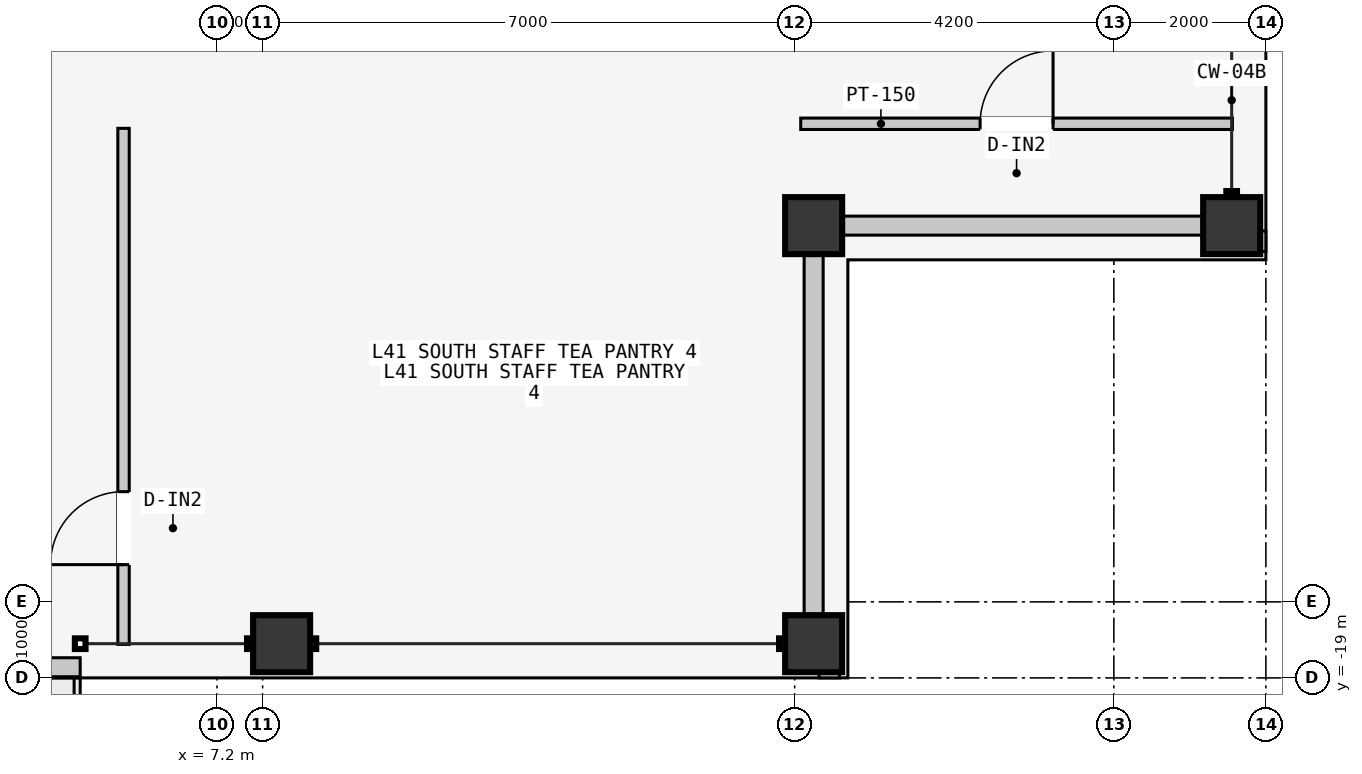
"""IFC4 building model, lengths in metres.
Left out: names, types, materials, properties, quantities, classifications, styles, units other than length and angle.
Written with IfcOpenShell. Run it as: python <this file> out.ifc"""

import sys

from ifc_helpers import new_model, si_unit, direction, frame, frame_2d, origin, origin_2d, place, context, subcontext, project, spatial, rectangle, hollow_rectangle, extrude, element, fill, save


model = new_model("IFC4")
c1 = context("Model", 3, precision=1e-05, world=origin(), true_north=direction((0.0, 1.0)))
c2 = subcontext(c1, "Body", "Model", "MODEL_VIEW")
j1 = project(units=[si_unit("LENGTHUNIT", "METRE"), si_unit("PLANEANGLEUNIT", "RADIAN")], contexts=[c1])
p1 = place(None, origin())
s1 = spatial("IfcSite", under=j1, at=p1, CompositionType="ELEMENT")
p2 = place(p1, origin())
s2 = spatial("IfcBuilding", under=s1, at=p2, CompositionType="ELEMENT")
p3 = place(p2, frame((0.0, 0.0, 158.7)))
s3 = spatial("IfcBuildingStorey", under=s2, at=p3, CompositionType="ELEMENT", Elevation=158.7)
for number, where, z_axis, x_axis in (
    (1, (8.05, -18.55, 0.0), (0.0, 0.0, 1.0), (1.0, 0.0, 0.0)),
    (2, (15.05, -18.55, 0.0), (0.0, 0.0, 1.0), (1.0, 0.0, 0.0)),
    (3, (20.55, -13.05, 0.0), (0.0, 0.0, 1.0), (0.0, 1.0, 0.0)),
    (4, (15.05, -13.05, 0.0), (0.0, 0.0, 1.0), (1.0, 0.0, 0.0)),
):
    element("IfcColumn", number, at=place(p3, frame(where, z_axis=z_axis, x_axis=x_axis)), inside=s3, PredefinedType="COLUMN", context=c2, shape_type="SweptSolid", body=[
        extrude(hollow_rectangle(XDim=0.75, YDim=0.75, WallThickness=0.032, at=origin_2d()), origin(), (0.0, 0.0, 1.0), 3.6),
    ])
p4 = place(p3, frame((-5.4, -18.86, 0.0), z_axis=(0.0, 0.0, 1.0), x_axis=(1.0, 0.0, 0.0)))
e5 = element("IfcWall", 5, at=p4, inside=s3, PredefinedType="STANDARD", context=c2, shape_type="SweptSolid", body=[
    extrude(rectangle(XDim=10.8, YDim=0.25, at=frame_2d((5.4, 0.0))), origin(), (0.0, 0.0, 1.0), 3.4),
])
p5 = place(p4, frame((7.0, 0.0, 0.0)))
e6 = element("IfcOpeningElement", 6, at=p5, cuts=e5, PredefinedType="OPENING", context=c2, shape_type="SweptSolid", body=[
    extrude(rectangle(XDim=1.6, YDim=2.2, at=frame_2d((0.8, 1.1))), frame((0.0, 0.135, 0.0), z_axis=(0.0, -1.0, 0.0), x_axis=(1.0, 0.0, 0.0)), (0.0, 0.0, 1.0), 0.27),
])
p6 = place(p4, frame((1.8, 0.0, 0.85)))
e7 = element("IfcOpeningElement", 7, at=p6, cuts=e5, PredefinedType="OPENING", context=c2, shape_type="SweptSolid", body=[
    extrude(rectangle(XDim=2.0, YDim=2.1, at=frame_2d((1.0, 1.05))), frame((0.0, 0.135, 0.0), z_axis=(0.0, -1.0, 0.0), x_axis=(1.0, 0.0, 0.0)), (0.0, 0.0, 1.0), 0.27),
])
for number, where, z_axis, x_axis in (
    (8, (15.435, -13.05, 0.0), (0.0, 0.0, 1.0), (1.0, 0.0, 0.0)),
    (9, (15.05, -18.165, 0.0), (0.0, 0.0, 1.0), (0.0, 1.0, 0.0)),
):
    element("IfcWall", number, at=place(p3, frame(where, z_axis=z_axis, x_axis=x_axis)), inside=s3, PredefinedType="STANDARD", context=c2, shape_type="SweptSolid", body=[
        extrude(rectangle(XDim=4.73, YDim=0.25, at=frame_2d((2.365, 0.0))), origin(), (0.0, 0.0, 1.0), 2.75),
    ])
for number, where, z_axis, x_axis in (
    (10, (15.12, -18.89, 0.0), (0.0, 0.0, 1.0), (1.0, 0.0, 0.0)),
    (11, (20.89, -13.39, 0.0), (0.0, 0.0, 1.0), (0.0, 1.0, 0.0)),
):
    element("IfcWall", number, at=place(p3, frame(where, z_axis=z_axis, x_axis=x_axis)), inside=s3, PredefinedType="PARAPET", context=c2, shape_type="SweptSolid", body=[
        extrude(rectangle(XDim=0.27, YDim=0.22, at=frame_2d((0.135, 0.0))), origin(), (0.0, 0.0, 1.0), 1.2),
    ])
p7 = place(p3, frame((5.97, -18.56, 0.0), z_axis=(0.0, 0.0, 1.0), x_axis=(0.0, 1.0, 0.0)))
e12 = element("IfcWall", 12, at=p7, inside=s3, PredefinedType="PARTITIONING", context=c2, shape_type="SweptSolid", body=[
    extrude(rectangle(XDim=6.79, YDim=0.15, at=frame_2d((3.395, 0.0))), origin(), (0.0, 0.0, 1.0), 3.4),
])
p8 = place(p7, frame((1.05, 0.0, 0.0)))
e13 = element("IfcOpeningElement", 13, at=p8, cuts=e12, PredefinedType="OPENING", context=c2, shape_type="SweptSolid", body=[
    extrude(rectangle(XDim=0.96, YDim=2.18, at=frame_2d((0.48, 1.09))), frame((0.0, 0.085, 0.0), z_axis=(0.0, -1.0, 0.0), x_axis=(1.0, 0.0, 0.0)), (0.0, 0.0, 1.0), 0.17),
])
p9 = place(p3, frame((14.88, -11.71, 0.0), z_axis=(0.0, 0.0, 1.0), x_axis=(1.0, 0.0, 0.0)))
e14 = element("IfcWall", 14, at=p9, inside=s3, PredefinedType="PARTITIONING", context=c2, shape_type="SweptSolid", body=[
    extrude(rectangle(XDim=5.68, YDim=0.15, at=frame_2d((2.84, 0.0))), origin(), (0.0, 0.0, 1.0), 3.4),
])
p10 = place(p9, frame((2.36, 0.0, 0.0)))
e15 = element("IfcOpeningElement", 15, at=p10, cuts=e14, PredefinedType="OPENING", context=c2, shape_type="SweptSolid", body=[
    extrude(rectangle(XDim=0.96, YDim=2.18, at=frame_2d((0.48, 1.09))), frame((0.0, 0.085, 0.0), z_axis=(0.0, -1.0, 0.0), x_axis=(1.0, 0.0, 0.0)), (0.0, 0.0, 1.0), 0.17),
])
p11 = place(p8, origin())
e16 = element("IfcDoor", 16, at=p11, inside=s3, OperationType="SINGLE_SWING_LEFT", PredefinedType="DOOR", context=c2, shape_type="SweptSolid", body=[
    extrude(rectangle(XDim=0.96, YDim=2.18, at=frame_2d((0.48, 1.09))), frame((0.0, 0.025, 0.0), z_axis=(0.0, -1.0, 0.0), x_axis=(1.0, 0.0, 0.0)), (0.0, 0.0, 1.0), 0.05),
])
fill(e13, e16)
p12 = place(p10, origin())
e17 = element("IfcDoor", 17, at=p12, inside=s3, OperationType="SINGLE_SWING_RIGHT", PredefinedType="DOOR", context=c2, shape_type="SweptSolid", body=[
    extrude(rectangle(XDim=0.96, YDim=2.18, at=frame_2d((0.48, 1.09))), frame((0.0, 0.025, 0.0), z_axis=(0.0, -1.0, 0.0), x_axis=(1.0, 0.0, 0.0)), (0.0, 0.0, 1.0), 0.05),
])
fill(e15, e17)
save(model, sys.argv[1])
